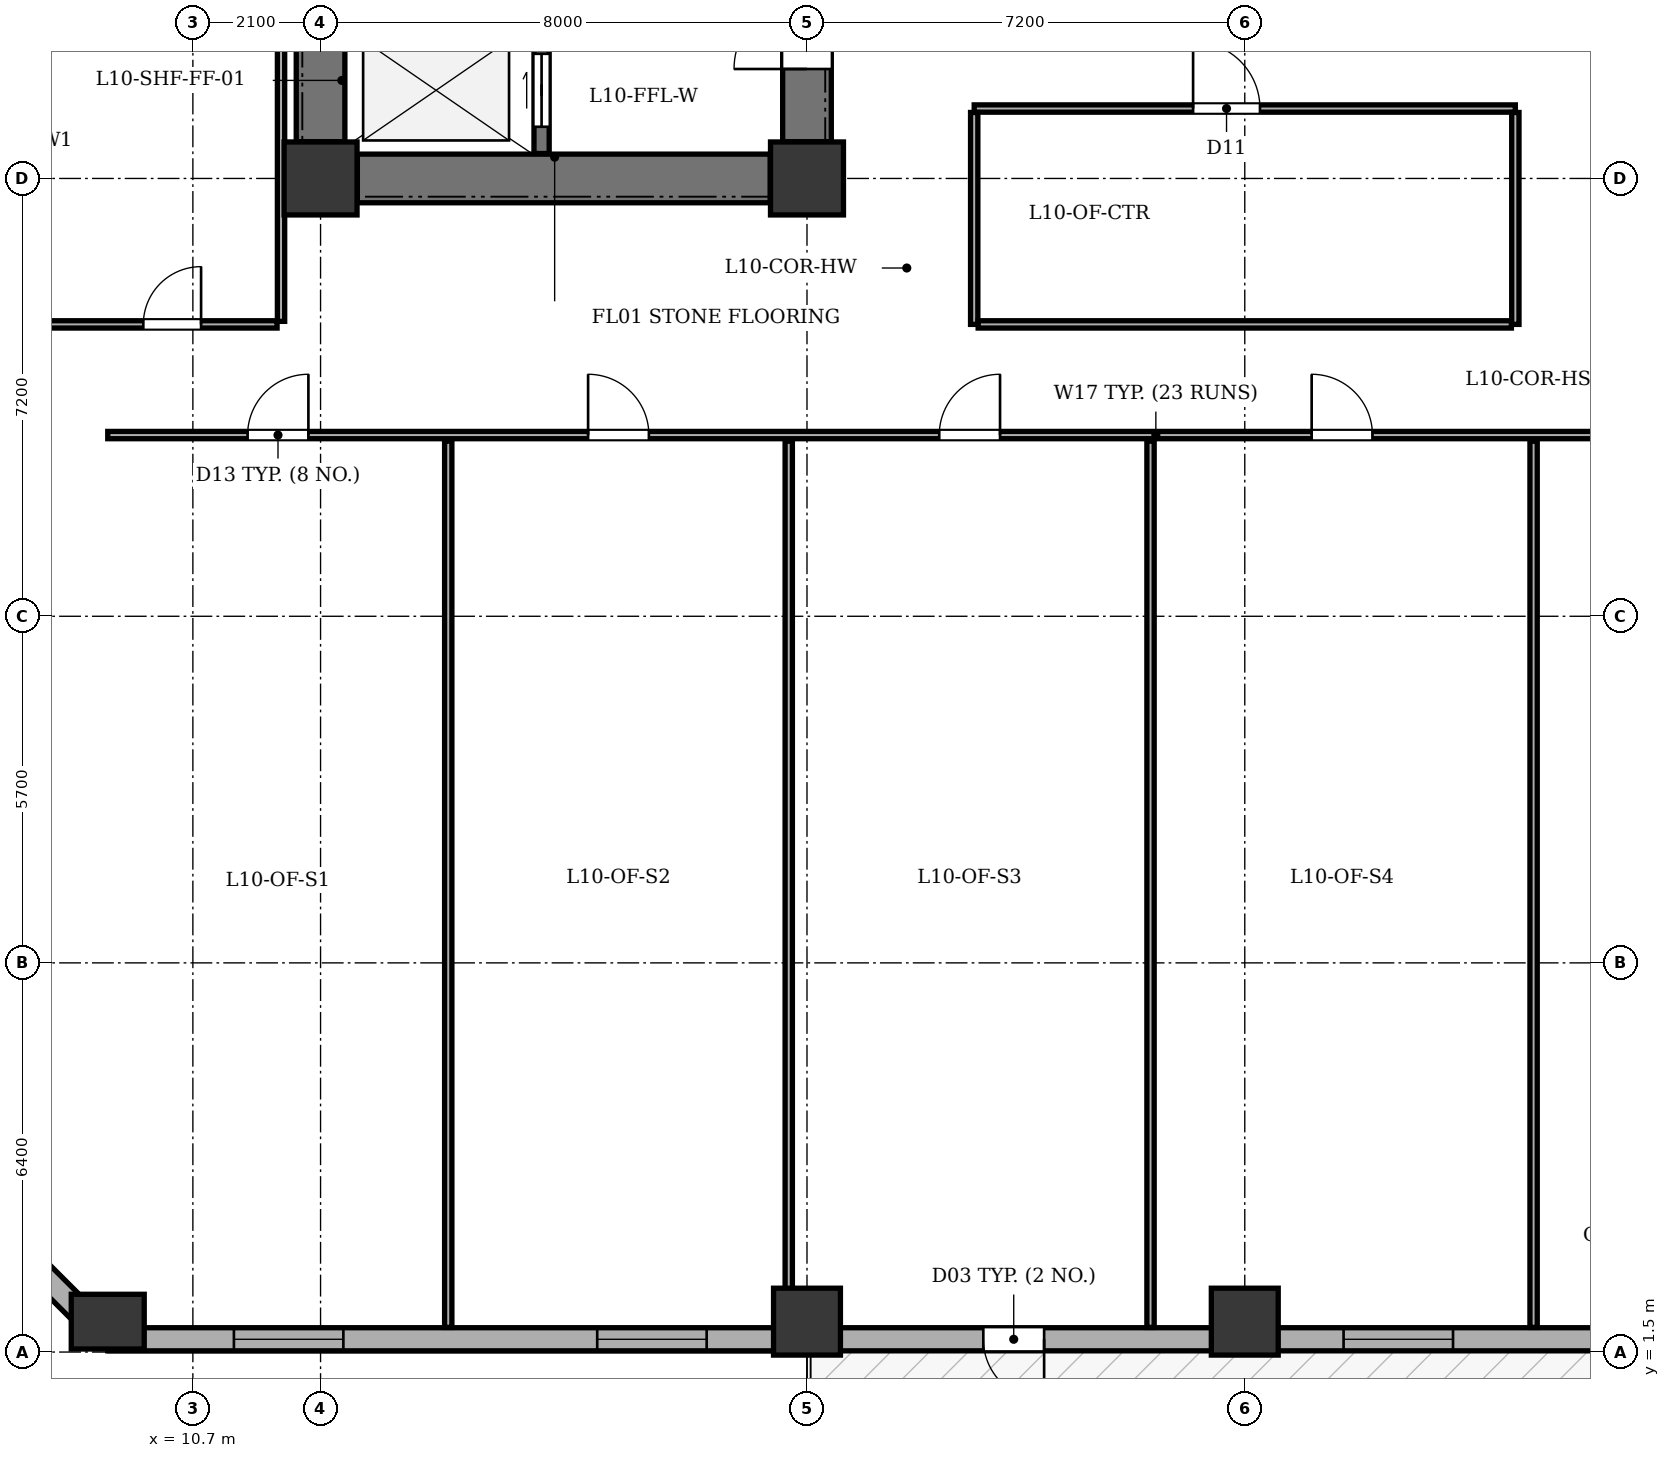
"""IFC4 building model, lengths in metres.
Left out: names, types, materials, properties, quantities, classifications, styles, units other than length and angle.
Written with IfcOpenShell. Run it as: python <this file> out.ifc"""

import sys

from ifc_helpers import new_model, si_unit, direction, frame, frame_2d, origin, origin_2d, place, context, subcontext, project, spatial, rectangle, extrude, element, fill, save


model = new_model("IFC4")
c1 = context("Model", 3, precision=1e-05, world=origin(), true_north=direction((0.0, 1.0)))
c2 = subcontext(c1, "Body", "Model", "MODEL_VIEW")
j1 = project(units=[si_unit("LENGTHUNIT", "METRE"), si_unit("PLANEANGLEUNIT", "RADIAN")], contexts=[c1])
p1 = place(None, origin())
s1 = spatial("IfcSite", under=j1, at=p1, CompositionType="ELEMENT")
p2 = place(p1, origin())
s2 = spatial("IfcBuilding", under=s1, at=p2, CompositionType="ELEMENT")
p3 = place(p2, frame((0.0, 0.0, 43.8)))
s3 = spatial("IfcBuildingStorey", under=s2, at=p3, CompositionType="ELEMENT", Elevation=43.8)
for number, where, z_axis, x_axis in (
    (1, (12.8, 20.8, 0.0), (0.0, 0.0, 1.0), (1.0, 0.0, 0.0)),
    (2, (20.8, 20.8, 0.0), (0.0, 0.0, 1.0), (1.0, 0.0, 0.0)),
):
    element("IfcColumn", number, at=place(p3, frame(where, z_axis=z_axis, x_axis=x_axis)), inside=s3, PredefinedType="COLUMN", context=c2, shape_type="SweptSolid", body=[
        extrude(rectangle(XDim=1.2, YDim=1.2, at=origin_2d()), origin(), (0.0, 0.0, 1.0), 3.9),
    ])
p4 = place(p3, frame((9.3, 2.0, 0.0), z_axis=(0.0, 0.0, 1.0), x_axis=(1.0, 0.0, 0.0)))
e3 = element("IfcColumn", 3, at=p4, inside=s3, PredefinedType="COLUMN", context=c2, shape_type="SweptSolid", body=[
    extrude(rectangle(XDim=0.9, YDim=1.2, at=origin_2d()), origin(), (0.0, 0.0, 1.0), 3.9),
])
for number, where, z_axis, x_axis in (
    (4, (20.8, 2.0, 0.0), (0.0, 0.0, 1.0), (1.0, 0.0, 0.0)),
    (5, (28.0, 2.0, 0.0), (0.0, 0.0, 1.0), (1.0, 0.0, 0.0)),
):
    element("IfcColumn", number, at=place(p3, frame(where, z_axis=z_axis, x_axis=x_axis)), inside=s3, PredefinedType="COLUMN", context=c2, shape_type="SweptSolid", body=[
        extrude(rectangle(XDim=1.1, YDim=1.1, at=origin_2d()), origin(), (0.0, 0.0, 1.0), 3.9),
    ])
p5 = place(p3, frame((44.3, 1.71, 0.0), z_axis=(0.0, 0.0, 1.0), x_axis=(-1.0, 0.0, 0.0)))
e6 = element("IfcWall", 6, at=p5, inside=s3, PredefinedType="STANDARD", context=c2, shape_type="SweptSolid", body=[
    extrude(rectangle(XDim=35.0, YDim=0.38, at=frame_2d((17.5, 0.0))), origin(), (0.0, 0.0, 1.0), 2.835),
])
p6 = place(p5, frame((19.6, 0.0, 0.0)))
e7 = element("IfcOpeningElement", 7, at=p6, cuts=e6, PredefinedType="OPENING", context=c2, shape_type="SweptSolid", body=[
    extrude(rectangle(XDim=1.0, YDim=2.02, at=frame_2d((0.5, 1.01))), frame((0.0, 0.2, 0.0), z_axis=(0.0, -1.0, 0.0), x_axis=(1.0, 0.0, 0.0)), (0.0, 0.0, 1.0), 0.4),
])
p7 = place(p5, frame((2.075, 0.0, 0.8)))
e8 = element("IfcOpeningElement", 8, at=p7, cuts=e6, PredefinedType="OPENING", context=c2, shape_type="SweptSolid", body=[
    extrude(rectangle(XDim=1.8, YDim=1.9, at=frame_2d((0.9, 0.95))), frame((0.0, 0.2, 0.0), z_axis=(0.0, -1.0, 0.0), x_axis=(1.0, 0.0, 0.0)), (0.0, 0.0, 1.0), 0.4),
])
p8 = place(p5, frame((6.45, 0.0, 0.8)))
e9 = element("IfcOpeningElement", 9, at=p8, cuts=e6, PredefinedType="OPENING", context=c2, shape_type="SweptSolid", body=[
    extrude(rectangle(XDim=1.5, YDim=1.9, at=frame_2d((0.75, 0.95))), frame((0.0, 0.2, 0.0), z_axis=(0.0, -1.0, 0.0), x_axis=(1.0, 0.0, 0.0)), (0.0, 0.0, 1.0), 0.4),
])
p9 = place(p5, frame((12.875, 0.0, 0.8)))
e10 = element("IfcOpeningElement", 10, at=p9, cuts=e6, PredefinedType="OPENING", context=c2, shape_type="SweptSolid", body=[
    extrude(rectangle(XDim=1.8, YDim=1.9, at=frame_2d((0.9, 0.95))), frame((0.0, 0.2, 0.0), z_axis=(0.0, -1.0, 0.0), x_axis=(1.0, 0.0, 0.0)), (0.0, 0.0, 1.0), 0.4),
])
p10 = place(p5, frame((25.15, 0.0, 0.8)))
e11 = element("IfcOpeningElement", 11, at=p10, cuts=e6, PredefinedType="OPENING", context=c2, shape_type="SweptSolid", body=[
    extrude(rectangle(XDim=1.8, YDim=1.9, at=frame_2d((0.9, 0.95))), frame((0.0, 0.2, 0.0), z_axis=(0.0, -1.0, 0.0), x_axis=(1.0, 0.0, 0.0)), (0.0, 0.0, 1.0), 0.4),
])
p11 = place(p5, frame((31.125, 0.0, 0.8)))
e12 = element("IfcOpeningElement", 12, at=p11, cuts=e6, PredefinedType="OPENING", context=c2, shape_type="SweptSolid", body=[
    extrude(rectangle(XDim=1.8, YDim=1.9, at=frame_2d((0.9, 0.95))), frame((0.0, 0.2, 0.0), z_axis=(0.0, -1.0, 0.0), x_axis=(1.0, 0.0, 0.0)), (0.0, 0.0, 1.0), 0.4),
])
p12 = place(p3, frame((9.3, 1.71, 0.0), z_axis=(0.0, 0.0, 1.0), x_axis=(-0.707106781187, 0.707106781187, 0.0)))
e13 = element("IfcWall", 13, at=p12, inside=s3, PredefinedType="STANDARD", context=c2, shape_type="SweptSolid", body=[
    extrude(rectangle(XDim=6.774, YDim=0.38, at=frame_2d((3.387, 0.0))), origin(), (0.0, 0.0, 1.0), 2.835),
])
p13 = place(p12, frame((2.687, 0.0, 0.8)))
e14 = element("IfcOpeningElement", 14, at=p13, cuts=e13, PredefinedType="OPENING", context=c2, shape_type="SweptSolid", body=[
    extrude(rectangle(XDim=1.4, YDim=1.65, at=frame_2d((0.7, 0.825))), frame((0.0, 0.2, 0.0), z_axis=(0.0, -1.0, 0.0), x_axis=(1.0, 0.0, 0.0)), (0.0, 0.0, 1.0), 0.4),
])
p14 = place(p3, frame((12.8, 21.405, 0.0), z_axis=(0.0, 0.0, 1.0), x_axis=(0.0, 1.0, 0.0)))
e15 = element("IfcWall", 15, at=p14, inside=s3, PredefinedType="SHEAR", context=c2, shape_type="SweptSolid", body=[
    extrude(rectangle(XDim=11.59, YDim=0.8, at=frame_2d((5.795, 0.0))), origin(), (0.0, 0.0, 1.0), 3.45),
])
p15 = place(p3, frame((13.405, 20.8, 0.0), z_axis=(0.0, 0.0, 1.0), x_axis=(1.0, 0.0, 0.0)))
e16 = element("IfcWall", 16, at=p15, inside=s3, PredefinedType="SHEAR", context=c2, shape_type="SweptSolid", body=[
    extrude(rectangle(XDim=6.79, YDim=0.8, at=frame_2d((3.395, 0.0))), origin(), (0.0, 0.0, 1.0), 3.45),
])
p16 = place(p3, frame((20.8, 21.405, 0.0), z_axis=(0.0, 0.0, 1.0), x_axis=(0.0, 1.0, 0.0)))
e17 = element("IfcWall", 17, at=p16, inside=s3, PredefinedType="SHEAR", context=c2, shape_type="SweptSolid", body=[
    extrude(rectangle(XDim=11.59, YDim=0.8, at=frame_2d((5.795, 0.0))), origin(), (0.0, 0.0, 1.0), 3.45),
])
p17 = place(p16, frame((1.195, 0.0, 0.0)))
e18 = element("IfcOpeningElement", 18, at=p17, cuts=e17, PredefinedType="OPENING", context=c2, shape_type="SweptSolid", body=[
    extrude(rectangle(XDim=1.2, YDim=2.15, at=frame_2d((0.6, 1.075))), frame((0.0, 0.41, 0.0), z_axis=(0.0, -1.0, 0.0), x_axis=(1.0, 0.0, 0.0)), (0.0, 0.0, 1.0), 0.82),
])
p18 = place(p16, frame((4.195, 0.0, 0.0)))
e19 = element("IfcOpeningElement", 19, at=p18, cuts=e17, PredefinedType="OPENING", context=c2, shape_type="SweptSolid", body=[
    extrude(rectangle(XDim=1.1, YDim=2.1, at=frame_2d((0.55, 1.05))), frame((0.0, 0.41, 0.0), z_axis=(0.0, -1.0, 0.0), x_axis=(1.0, 0.0, 0.0)), (0.0, 0.0, 1.0), 0.82),
])
p19 = place(p16, frame((6.145, 0.0, 0.0)))
e20 = element("IfcOpeningElement", 20, at=p19, cuts=e17, PredefinedType="OPENING", context=c2, shape_type="SweptSolid", body=[
    extrude(rectangle(XDim=1.1, YDim=2.1, at=frame_2d((0.55, 1.05))), frame((0.0, 0.41, 0.0), z_axis=(0.0, -1.0, 0.0), x_axis=(1.0, 0.0, 0.0)), (0.0, 0.0, 1.0), 0.82),
])
p20 = place(p16, frame((8.095, 0.0, 0.0)))
e21 = element("IfcOpeningElement", 21, at=p20, cuts=e17, PredefinedType="OPENING", context=c2, shape_type="SweptSolid", body=[
    extrude(rectangle(XDim=1.1, YDim=2.1, at=frame_2d((0.55, 1.05))), frame((0.0, 0.41, 0.0), z_axis=(0.0, -1.0, 0.0), x_axis=(1.0, 0.0, 0.0)), (0.0, 0.0, 1.0), 0.82),
])
p21 = place(p3, frame((16.435, 21.21, 0.0), z_axis=(0.0, 0.0, 1.0), x_axis=(0.0, 1.0, 0.0)))
e22 = element("IfcWall", 22, at=p21, inside=s3, PredefinedType="SHEAR", context=c2, shape_type="SweptSolid", body=[
    extrude(rectangle(XDim=11.98, YDim=0.25, at=frame_2d((5.99, 0.0))), origin(), (0.0, 0.0, 1.0), 3.45),
])
p22 = place(p21, frame((0.44, 0.0, 0.0)))
e23 = element("IfcOpeningElement", 23, at=p22, cuts=e22, PredefinedType="OPENING", context=c2, shape_type="SweptSolid", body=[
    extrude(rectangle(XDim=1.2, YDim=2.15, at=frame_2d((0.6, 1.075))), frame((0.0, 0.135, 0.0), z_axis=(0.0, -1.0, 0.0), x_axis=(1.0, 0.0, 0.0)), (0.0, 0.0, 1.0), 0.27),
])
p23 = place(p21, frame((2.59, 0.0, 0.0)))
e24 = element("IfcOpeningElement", 24, at=p23, cuts=e22, PredefinedType="OPENING", context=c2, shape_type="SweptSolid", body=[
    extrude(rectangle(XDim=1.15, YDim=2.15, at=frame_2d((0.575, 1.075))), frame((0.0, 0.135, 0.0), z_axis=(0.0, -1.0, 0.0), x_axis=(1.0, 0.0, 0.0)), (0.0, 0.0, 1.0), 0.27),
])
p24 = place(p3, frame((23.55, 21.95, 0.0), z_axis=(0.0, 0.0, 1.0), x_axis=(1.0, 0.0, 0.0)))
e25 = element("IfcWall", 25, at=p24, inside=s3, PredefinedType="PARTITIONING", context=c2, shape_type="SweptSolid", body=[
    extrude(rectangle(XDim=8.9, YDim=0.12, at=frame_2d((4.45, 0.0))), origin(), (0.0, 0.0, 1.0), 2.885),
])
p25 = place(p24, frame((3.6, 0.0, 0.0)))
e26 = element("IfcOpeningElement", 26, at=p25, cuts=e25, PredefinedType="OPENING", context=c2, shape_type="SweptSolid", body=[
    extrude(rectangle(XDim=1.1, YDim=2.15, at=frame_2d((0.55, 1.075))), frame((0.0, 0.07, 0.0), z_axis=(0.0, -1.0, 0.0), x_axis=(1.0, 0.0, 0.0)), (0.0, 0.0, 1.0), 0.14),
])
for number, where, z_axis, x_axis in (
    (27, (23.55, 18.4, 0.0), (0.0, 0.0, 1.0), (0.0, 1.0, 0.0)),
    (28, (32.45, 18.4, 0.0), (0.0, 0.0, 1.0), (0.0, 1.0, 0.0)),
):
    element("IfcWall", number, at=place(p3, frame(where, z_axis=z_axis, x_axis=x_axis)), inside=s3, PredefinedType="PARTITIONING", context=c2, shape_type="SweptSolid", body=[
        extrude(rectangle(XDim=3.485, YDim=0.12, at=frame_2d((1.743, 0.0))), origin(), (0.0, 0.0, 1.0), 3.45),
    ])
p26 = place(p3, frame((23.615, 18.4, 0.0), z_axis=(0.0, 0.0, 1.0), x_axis=(1.0, 0.0, 0.0)))
e29 = element("IfcWall", 29, at=p26, inside=s3, PredefinedType="PARTITIONING", context=c2, shape_type="SweptSolid", body=[
    extrude(rectangle(XDim=8.77, YDim=0.12, at=frame_2d((4.385, 0.0))), origin(), (0.0, 0.0, 1.0), 3.45),
])
p27 = place(p3, frame((9.3, 16.58, 0.0), z_axis=(0.0, 0.0, 1.0), x_axis=(1.0, 0.0, 0.0)))
e30 = element("IfcWall", 30, at=p27, inside=s3, PredefinedType="PARTITIONING", context=c2, shape_type="SweptSolid", body=[
    extrude(rectangle(XDim=35.0, YDim=0.12, at=frame_2d((17.5, 0.0))), origin(), (0.0, 0.0, 1.0), 3.45),
])
p28 = place(p27, frame((2.3, 0.0, 0.0)))
e31 = element("IfcOpeningElement", 31, at=p28, cuts=e30, PredefinedType="OPENING", context=c2, shape_type="SweptSolid", body=[
    extrude(rectangle(XDim=1.0, YDim=2.1, at=frame_2d((0.5, 1.05))), frame((0.0, 0.07, 0.0), z_axis=(0.0, -1.0, 0.0), x_axis=(1.0, 0.0, 0.0)), (0.0, 0.0, 1.0), 0.14),
])
p29 = place(p27, frame((7.9, 0.0, 0.0)))
e32 = element("IfcOpeningElement", 32, at=p29, cuts=e30, PredefinedType="OPENING", context=c2, shape_type="SweptSolid", body=[
    extrude(rectangle(XDim=1.0, YDim=2.1, at=frame_2d((0.5, 1.05))), frame((0.0, 0.07, 0.0), z_axis=(0.0, -1.0, 0.0), x_axis=(1.0, 0.0, 0.0)), (0.0, 0.0, 1.0), 0.14),
])
p30 = place(p27, frame((13.675, 0.0, 0.0)))
e33 = element("IfcOpeningElement", 33, at=p30, cuts=e30, PredefinedType="OPENING", context=c2, shape_type="SweptSolid", body=[
    extrude(rectangle(XDim=1.0, YDim=2.1, at=frame_2d((0.5, 1.05))), frame((0.0, 0.07, 0.0), z_axis=(0.0, -1.0, 0.0), x_axis=(1.0, 0.0, 0.0)), (0.0, 0.0, 1.0), 0.14),
])
p31 = place(p27, frame((19.8, 0.0, 0.0)))
e34 = element("IfcOpeningElement", 34, at=p31, cuts=e30, PredefinedType="OPENING", context=c2, shape_type="SweptSolid", body=[
    extrude(rectangle(XDim=1.0, YDim=2.1, at=frame_2d((0.5, 1.05))), frame((0.0, 0.07, 0.0), z_axis=(0.0, -1.0, 0.0), x_axis=(1.0, 0.0, 0.0)), (0.0, 0.0, 1.0), 0.14),
])
p32 = place(p27, frame((25.925, 0.0, 0.0)))
e35 = element("IfcOpeningElement", 35, at=p32, cuts=e30, PredefinedType="OPENING", context=c2, shape_type="SweptSolid", body=[
    extrude(rectangle(XDim=1.0, YDim=2.1, at=frame_2d((0.5, 1.05))), frame((0.0, 0.07, 0.0), z_axis=(0.0, -1.0, 0.0), x_axis=(1.0, 0.0, 0.0)), (0.0, 0.0, 1.0), 0.14),
])
p33 = place(p27, frame((31.7, 0.0, 0.0)))
e36 = element("IfcOpeningElement", 36, at=p33, cuts=e30, PredefinedType="OPENING", context=c2, shape_type="SweptSolid", body=[
    extrude(rectangle(XDim=1.0, YDim=2.1, at=frame_2d((0.5, 1.05))), frame((0.0, 0.07, 0.0), z_axis=(0.0, -1.0, 0.0), x_axis=(1.0, 0.0, 0.0)), (0.0, 0.0, 1.0), 0.14),
])
for number, where, z_axis, x_axis in (
    (37, (14.9, 1.905, 0.0), (0.0, 0.0, 1.0), (0.0, 1.0, 0.0)),
    (38, (20.5, 1.905, 0.0), (0.0, 0.0, 1.0), (0.0, 1.0, 0.0)),
    (39, (26.45, 1.905, 0.0), (0.0, 0.0, 1.0), (0.0, 1.0, 0.0)),
    (40, (32.75, 1.905, 0.0), (0.0, 0.0, 1.0), (0.0, 1.0, 0.0)),
):
    element("IfcWall", number, at=place(p3, frame(where, z_axis=z_axis, x_axis=x_axis)), inside=s3, PredefinedType="PARTITIONING", context=c2, shape_type="SweptSolid", body=[
        extrude(rectangle(XDim=14.575, YDim=0.12, at=frame_2d((7.288, 0.0))), origin(), (0.0, 0.0, 1.0), 3.45),
    ])
p34 = place(p3, frame((12.15, 18.45, 0.0), z_axis=(0.0, 0.0, 1.0), x_axis=(0.0, 1.0, 0.0)))
e41 = element("IfcWall", 41, at=p34, inside=s3, PredefinedType="PARTITIONING", context=c2, shape_type="SweptSolid", body=[
    extrude(rectangle(XDim=17.5, YDim=0.12, at=frame_2d((8.75, 0.0))), origin(), (0.0, 0.0, 1.0), 3.45),
])
p35 = place(p3, frame((4.705, 18.4, 0.0), z_axis=(0.0, 0.0, 1.0), x_axis=(1.0, 0.0, 0.0)))
e42 = element("IfcWall", 42, at=p35, inside=s3, PredefinedType="PARTITIONING", context=c2, shape_type="SweptSolid", body=[
    extrude(rectangle(XDim=7.38, YDim=0.12, at=frame_2d((3.69, 0.0))), origin(), (0.0, 0.0, 1.0), 3.45),
])
p36 = place(p35, frame((5.18, 0.0, 0.0)))
e43 = element("IfcOpeningElement", 43, at=p36, cuts=e42, PredefinedType="OPENING", context=c2, shape_type="SweptSolid", body=[
    extrude(rectangle(XDim=0.95, YDim=2.1, at=frame_2d((0.475, 1.05))), frame((0.0, 0.07, 0.0), z_axis=(0.0, -1.0, 0.0), x_axis=(1.0, 0.0, 0.0)), (0.0, 0.0, 1.0), 0.14),
])
p37 = place(p6, origin())
e44 = element("IfcDoor", 44, at=p37, inside=s3, OperationType="SINGLE_SWING_LEFT", PredefinedType="DOOR", context=c2, shape_type="SweptSolid", body=[
    extrude(rectangle(XDim=1.0, YDim=2.02, at=frame_2d((0.5, 1.01))), frame((0.0, 0.025, 0.0), z_axis=(0.0, -1.0, 0.0), x_axis=(1.0, 0.0, 0.0)), (0.0, 0.0, 1.0), 0.05),
])
fill(e7, e44)
p38 = place(p9, origin())
e45 = element("IfcWindow", 45, at=p38, inside=s3, PartitioningType="SINGLE_PANEL", PredefinedType="WINDOW", context=c2, shape_type="SweptSolid", body=[
    extrude(rectangle(XDim=1.8, YDim=1.9, at=frame_2d((0.9, 0.95))), frame((0.0, -0.01, 0.0), z_axis=(0.0, -1.0, 0.0), x_axis=(1.0, 0.0, 0.0)), (0.0, 0.0, 1.0), 0.06),
])
fill(e10, e45)
p39 = place(p10, origin())
e46 = element("IfcWindow", 46, at=p39, inside=s3, PartitioningType="SINGLE_PANEL", PredefinedType="WINDOW", context=c2, shape_type="SweptSolid", body=[
    extrude(rectangle(XDim=1.8, YDim=1.9, at=frame_2d((0.9, 0.95))), frame((0.0, -0.01, 0.0), z_axis=(0.0, -1.0, 0.0), x_axis=(1.0, 0.0, 0.0)), (0.0, 0.0, 1.0), 0.06),
])
fill(e11, e46)
p40 = place(p11, origin())
e47 = element("IfcWindow", 47, at=p40, inside=s3, PartitioningType="SINGLE_PANEL", PredefinedType="WINDOW", context=c2, shape_type="SweptSolid", body=[
    extrude(rectangle(XDim=1.8, YDim=1.9, at=frame_2d((0.9, 0.95))), frame((0.0, -0.01, 0.0), z_axis=(0.0, -1.0, 0.0), x_axis=(1.0, 0.0, 0.0)), (0.0, 0.0, 1.0), 0.06),
])
fill(e12, e47)
p41 = place(p17, origin())
e48 = element("IfcDoor", 48, at=p41, inside=s3, OperationType="SINGLE_SWING_LEFT", PredefinedType="DOOR", context=c2, shape_type="SweptSolid", body=[
    extrude(rectangle(XDim=1.2, YDim=2.15, at=frame_2d((0.6, 1.075))), frame((0.0, 0.025, 0.0), z_axis=(0.0, -1.0, 0.0), x_axis=(1.0, 0.0, 0.0)), (0.0, 0.0, 1.0), 0.05),
])
fill(e18, e48)
p42 = place(p22, origin())
e49 = element("IfcDoor", 49, at=p42, inside=s3, OperationType="DOUBLE_DOOR_SLIDING", PredefinedType="DOOR", context=c2, shape_type="SweptSolid", body=[
    extrude(rectangle(XDim=1.2, YDim=2.15, at=frame_2d((0.6, 1.075))), frame((0.0, 0.025, 0.0), z_axis=(0.0, -1.0, 0.0), x_axis=(1.0, 0.0, 0.0)), (0.0, 0.0, 1.0), 0.05),
])
fill(e23, e49)
p43 = place(p25, origin())
e50 = element("IfcDoor", 50, at=p43, inside=s3, OperationType="SINGLE_SWING_LEFT", PredefinedType="DOOR", context=c2, shape_type="SweptSolid", body=[
    extrude(rectangle(XDim=1.1, YDim=2.15, at=frame_2d((0.55, 1.075))), frame((0.0, 0.025, 0.0), z_axis=(0.0, -1.0, 0.0), x_axis=(1.0, 0.0, 0.0)), (0.0, 0.0, 1.0), 0.05),
])
fill(e26, e50)
p44 = place(p28, origin())
e51 = element("IfcDoor", 51, at=p44, inside=s3, OperationType="SINGLE_SWING_RIGHT", PredefinedType="DOOR", context=c2, shape_type="SweptSolid", body=[
    extrude(rectangle(XDim=1.0, YDim=2.1, at=frame_2d((0.5, 1.05))), frame((0.0, 0.025, 0.0), z_axis=(0.0, -1.0, 0.0), x_axis=(1.0, 0.0, 0.0)), (0.0, 0.0, 1.0), 0.05),
])
fill(e31, e51)
p45 = place(p29, origin())
e52 = element("IfcDoor", 52, at=p45, inside=s3, OperationType="SINGLE_SWING_LEFT", PredefinedType="DOOR", context=c2, shape_type="SweptSolid", body=[
    extrude(rectangle(XDim=1.0, YDim=2.1, at=frame_2d((0.5, 1.05))), frame((0.0, 0.025, 0.0), z_axis=(0.0, -1.0, 0.0), x_axis=(1.0, 0.0, 0.0)), (0.0, 0.0, 1.0), 0.05),
])
fill(e32, e52)
p46 = place(p30, origin())
e53 = element("IfcDoor", 53, at=p46, inside=s3, OperationType="SINGLE_SWING_RIGHT", PredefinedType="DOOR", context=c2, shape_type="SweptSolid", body=[
    extrude(rectangle(XDim=1.0, YDim=2.1, at=frame_2d((0.5, 1.05))), frame((0.0, 0.025, 0.0), z_axis=(0.0, -1.0, 0.0), x_axis=(1.0, 0.0, 0.0)), (0.0, 0.0, 1.0), 0.05),
])
fill(e33, e53)
p47 = place(p31, origin())
e54 = element("IfcDoor", 54, at=p47, inside=s3, OperationType="SINGLE_SWING_LEFT", PredefinedType="DOOR", context=c2, shape_type="SweptSolid", body=[
    extrude(rectangle(XDim=1.0, YDim=2.1, at=frame_2d((0.5, 1.05))), frame((0.0, 0.025, 0.0), z_axis=(0.0, -1.0, 0.0), x_axis=(1.0, 0.0, 0.0)), (0.0, 0.0, 1.0), 0.05),
])
fill(e34, e54)
p48 = place(p36, origin())
e55 = element("IfcDoor", 55, at=p48, inside=s3, OperationType="SINGLE_SWING_RIGHT", PredefinedType="DOOR", context=c2, shape_type="SweptSolid", body=[
    extrude(rectangle(XDim=0.95, YDim=2.1, at=frame_2d((0.475, 1.05))), frame((0.0, 0.025, 0.0), z_axis=(0.0, -1.0, 0.0), x_axis=(1.0, 0.0, 0.0)), (0.0, 0.0, 1.0), 0.05),
])
fill(e43, e55)
save(model, sys.argv[1])
